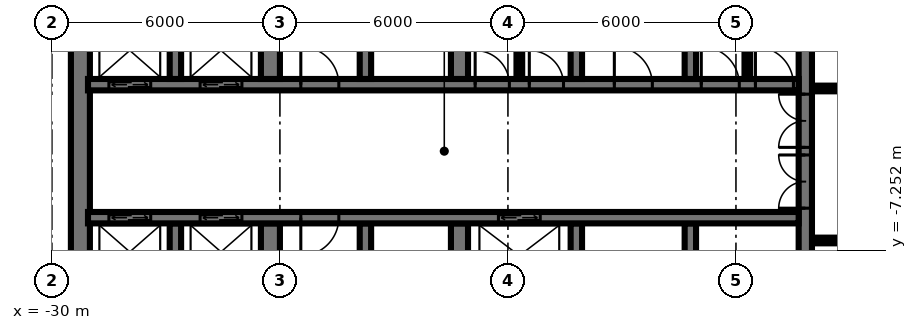
"""IFC4 building model, lengths in metres.
Left out: names, types, materials, properties, quantities, classifications, styles, units other than length and angle.
Written with IfcOpenShell. Run it as: python <this file> out.ifc"""

import sys

from ifc_helpers import new_model, si_unit, direction, frame, frame_2d, origin, place, context, subcontext, project, spatial, rectangle, extrude, element, fill, save


model = new_model("IFC4")
c1 = context("Model", 3, precision=1e-05, world=origin(), true_north=direction((0.0, 1.0)))
c2 = subcontext(c1, "Body", "Model", "MODEL_VIEW")
j1 = project(units=[si_unit("LENGTHUNIT", "METRE"), si_unit("PLANEANGLEUNIT", "RADIAN")], contexts=[c1])
p1 = place(None, origin())
s1 = spatial("IfcSite", under=j1, at=p1, CompositionType="ELEMENT")
p2 = place(p1, origin())
s2 = spatial("IfcBuilding", under=s1, at=p2, CompositionType="ELEMENT")
p3 = place(p2, frame((0.0, 0.0, 18.0)))
s3 = spatial("IfcBuildingStorey", under=s2, at=p3, CompositionType="ELEMENT", Elevation=18.0)
p4 = place(p3, frame((-10.175, -14.55, 0.0), z_axis=(0.0, 0.0, 1.0), x_axis=(0.0, 1.0, 0.0)))
e1 = element("IfcWall", 1, at=p4, inside=s3, PredefinedType="SHEAR", context=c2, shape_type="SweptSolid", body=[
    extrude(rectangle(XDim=14.1, YDim=0.35, at=frame_2d((7.05, 0.0))), origin(), (0.0, 0.0, 1.0), 6.0),
])
p5 = place(p4, frame((8.4, 0.0, 0.0)))
e2 = element("IfcOpeningElement", 2, at=p5, cuts=e1, PredefinedType="OPENING", context=c2, shape_type="SweptSolid", body=[
    extrude(rectangle(XDim=1.4, YDim=2.4, at=frame_2d((0.7, 1.2))), frame((0.0, 0.185, 0.0), z_axis=(0.0, -1.0, 0.0), x_axis=(1.0, 0.0, 0.0)), (0.0, 0.0, 1.0), 0.37),
])
p6 = place(p4, frame((10.0, 0.0, 0.0)))
e3 = element("IfcOpeningElement", 3, at=p6, cuts=e1, PredefinedType="OPENING", context=c2, shape_type="SweptSolid", body=[
    extrude(rectangle(XDim=1.4, YDim=2.4, at=frame_2d((0.7, 1.2))), frame((0.0, 0.185, 0.0), z_axis=(0.0, -1.0, 0.0), x_axis=(1.0, 0.0, 0.0)), (0.0, 0.0, 1.0), 0.37),
])
p7 = place(p4, frame((4.0, 0.0, 0.0)))
e4 = element("IfcOpeningElement", 4, at=p7, cuts=e1, PredefinedType="OPENING", context=c2, shape_type="SweptSolid", body=[
    extrude(rectangle(XDim=1.2, YDim=2.1, at=frame_2d((0.6, 1.05))), frame((0.0, 0.185, 0.0), z_axis=(0.0, -1.0, 0.0), x_axis=(1.0, 0.0, 0.0)), (0.0, 0.0, 1.0), 0.37),
])
p8 = place(p3, frame((-29.25, -14.55, 0.0), z_axis=(0.0, 0.0, 1.0), x_axis=(0.0, 1.0, 0.0)))
e5 = element("IfcWall", 5, at=p8, inside=s3, PredefinedType="SHEAR", context=c2, shape_type="SweptSolid", body=[
    extrude(rectangle(XDim=14.1, YDim=0.5, at=frame_2d((7.05, 0.0))), origin(), (0.0, 0.0, 1.0), 6.0),
])
p9 = place(p3, frame((-29.05, -2.9, 0.0), z_axis=(0.0, 0.0, 1.0), x_axis=(1.0, 0.0, 0.0)))
e6 = element("IfcWall", 6, at=p9, inside=s3, PredefinedType="SHEAR", context=c2, shape_type="SweptSolid", body=[
    extrude(rectangle(XDim=18.7, YDim=0.3, at=frame_2d((9.35, 0.0))), origin(), (0.0, 0.0, 1.0), 6.0),
])
p10 = place(p9, frame((2.95, 0.0, 0.0)))
e7 = element("IfcOpeningElement", 7, at=p10, cuts=e6, PredefinedType="OPENING", context=c2, shape_type="SweptSolid", body=[
    extrude(rectangle(XDim=1.1, YDim=2.1, at=frame_2d((0.55, 1.05))), frame((0.0, 0.16, 0.0), z_axis=(0.0, -1.0, 0.0), x_axis=(1.0, 0.0, 0.0)), (0.0, 0.0, 1.0), 0.32),
])
p11 = place(p9, frame((0.55, 0.0, 0.0)))
e8 = element("IfcOpeningElement", 8, at=p11, cuts=e6, PredefinedType="OPENING", context=c2, shape_type="SweptSolid", body=[
    extrude(rectangle(XDim=1.1, YDim=2.1, at=frame_2d((0.55, 1.05))), frame((0.0, 0.16, 0.0), z_axis=(0.0, -1.0, 0.0), x_axis=(1.0, 0.0, 0.0)), (0.0, 0.0, 1.0), 0.32),
])
p12 = place(p9, frame((11.613, 0.0, 0.0)))
e9 = element("IfcOpeningElement", 9, at=p12, cuts=e6, PredefinedType="OPENING", context=c2, shape_type="SweptSolid", body=[
    extrude(rectangle(XDim=0.9, YDim=2.1, at=frame_2d((0.45, 1.05))), frame((0.0, 0.16, 0.0), z_axis=(0.0, -1.0, 0.0), x_axis=(1.0, 0.0, 0.0)), (0.0, 0.0, 1.0), 0.32),
])
p13 = place(p9, frame((10.188, 0.0, 0.0)))
e10 = element("IfcOpeningElement", 10, at=p13, cuts=e6, PredefinedType="OPENING", context=c2, shape_type="SweptSolid", body=[
    extrude(rectangle(XDim=0.9, YDim=2.1, at=frame_2d((0.45, 1.05))), frame((0.0, 0.16, 0.0), z_axis=(0.0, -1.0, 0.0), x_axis=(1.0, 0.0, 0.0)), (0.0, 0.0, 1.0), 0.32),
])
p14 = place(p9, frame((17.562, 0.0, 0.0)))
e11 = element("IfcOpeningElement", 11, at=p14, cuts=e6, PredefinedType="OPENING", context=c2, shape_type="SweptSolid", body=[
    extrude(rectangle(XDim=1.0, YDim=2.1, at=frame_2d((0.5, 1.05))), frame((0.0, 0.16, 0.0), z_axis=(0.0, -1.0, 0.0), x_axis=(1.0, 0.0, 0.0)), (0.0, 0.0, 1.0), 0.32),
])
p15 = place(p9, frame((16.137, 0.0, 0.0)))
e12 = element("IfcOpeningElement", 12, at=p15, cuts=e6, PredefinedType="OPENING", context=c2, shape_type="SweptSolid", body=[
    extrude(rectangle(XDim=1.0, YDim=2.1, at=frame_2d((0.5, 1.05))), frame((0.0, 0.16, 0.0), z_axis=(0.0, -1.0, 0.0), x_axis=(1.0, 0.0, 0.0)), (0.0, 0.0, 1.0), 0.32),
])
p16 = place(p9, frame((13.85, 0.0, 0.0)))
e13 = element("IfcOpeningElement", 13, at=p16, cuts=e6, PredefinedType="OPENING", context=c2, shape_type="SweptSolid", body=[
    extrude(rectangle(XDim=1.0, YDim=2.1, at=frame_2d((0.5, 1.05))), frame((0.0, 0.16, 0.0), z_axis=(0.0, -1.0, 0.0), x_axis=(1.0, 0.0, 0.0)), (0.0, 0.0, 1.0), 0.32),
])
p17 = place(p9, frame((5.6, 0.0, 0.0)))
e14 = element("IfcOpeningElement", 14, at=p17, cuts=e6, PredefinedType="OPENING", context=c2, shape_type="SweptSolid", body=[
    extrude(rectangle(XDim=1.0, YDim=2.1, at=frame_2d((0.5, 1.05))), frame((0.0, 0.16, 0.0), z_axis=(0.0, -1.0, 0.0), x_axis=(1.0, 0.0, 0.0)), (0.0, 0.0, 1.0), 0.32),
])
p18 = place(p3, frame((-29.05, -6.4, 0.0), z_axis=(0.0, 0.0, 1.0), x_axis=(1.0, 0.0, 0.0)))
e15 = element("IfcWall", 15, at=p18, inside=s3, PredefinedType="SHEAR", context=c2, shape_type="SweptSolid", body=[
    extrude(rectangle(XDim=18.7, YDim=0.3, at=frame_2d((9.35, 0.0))), origin(), (0.0, 0.0, 1.0), 6.0),
])
p19 = place(p18, frame((2.95, 0.0, 0.0)))
e16 = element("IfcOpeningElement", 16, at=p19, cuts=e15, PredefinedType="OPENING", context=c2, shape_type="SweptSolid", body=[
    extrude(rectangle(XDim=1.1, YDim=2.1, at=frame_2d((0.55, 1.05))), frame((0.0, 0.16, 0.0), z_axis=(0.0, -1.0, 0.0), x_axis=(1.0, 0.0, 0.0)), (0.0, 0.0, 1.0), 0.32),
])
p20 = place(p18, frame((0.55, 0.0, 0.0)))
e17 = element("IfcOpeningElement", 17, at=p20, cuts=e15, PredefinedType="OPENING", context=c2, shape_type="SweptSolid", body=[
    extrude(rectangle(XDim=1.1, YDim=2.1, at=frame_2d((0.55, 1.05))), frame((0.0, 0.16, 0.0), z_axis=(0.0, -1.0, 0.0), x_axis=(1.0, 0.0, 0.0)), (0.0, 0.0, 1.0), 0.32),
])
p21 = place(p18, frame((10.8, 0.0, 0.0)))
e18 = element("IfcOpeningElement", 18, at=p21, cuts=e15, PredefinedType="OPENING", context=c2, shape_type="SweptSolid", body=[
    extrude(rectangle(XDim=1.1, YDim=2.1, at=frame_2d((0.55, 1.05))), frame((0.0, 0.16, 0.0), z_axis=(0.0, -1.0, 0.0), x_axis=(1.0, 0.0, 0.0)), (0.0, 0.0, 1.0), 0.32),
])
p22 = place(p18, frame((5.6, 0.0, 0.0)))
e19 = element("IfcOpeningElement", 19, at=p22, cuts=e15, PredefinedType="OPENING", context=c2, shape_type="SweptSolid", body=[
    extrude(rectangle(XDim=1.0, YDim=2.1, at=frame_2d((0.5, 1.05))), frame((0.0, 0.16, 0.0), z_axis=(0.0, -1.0, 0.0), x_axis=(1.0, 0.0, 0.0)), (0.0, 0.0, 1.0), 0.32),
])
for number, where, z_axis, x_axis in (
    (20, (-13.2, -2.75, 0.0), (0.0, 0.0, 1.0), (0.0, 1.0, 0.0)),
    (21, (-13.2, -8.85, 0.0), (0.0, 0.0, 1.0), (0.0, 1.0, 0.0)),
    (22, (-16.2, -2.75, 0.0), (0.0, 0.0, 1.0), (0.0, 1.0, 0.0)),
    (23, (-16.2, -8.85, 0.0), (0.0, 0.0, 1.0), (0.0, 1.0, 0.0)),
):
    element("IfcWall", number, at=place(p3, frame(where, z_axis=z_axis, x_axis=x_axis)), inside=s3, PredefinedType="SHEAR", context=c2, shape_type="SweptSolid", body=[
        extrude(rectangle(XDim=2.3, YDim=0.3, at=frame_2d((1.15, 0.0))), origin(), (0.0, 0.0, 1.0), 6.0),
    ])
for number, where, z_axis, x_axis in (
    (24, (-19.275, -2.75, 0.0), (0.0, 0.0, 1.0), (0.0, 1.0, 0.0)),
    (25, (-19.275, -8.85, 0.0), (0.0, 0.0, 1.0), (0.0, 1.0, 0.0)),
):
    element("IfcWall", number, at=place(p3, frame(where, z_axis=z_axis, x_axis=x_axis)), inside=s3, PredefinedType="SHEAR", context=c2, shape_type="SweptSolid", body=[
        extrude(rectangle(XDim=2.3, YDim=0.45, at=frame_2d((1.15, 0.0))), origin(), (0.0, 0.0, 1.0), 6.0),
    ])
for number, where, z_axis, x_axis in (
    (26, (-21.75, -2.75, 0.0), (0.0, 0.0, 1.0), (0.0, 1.0, 0.0)),
    (27, (-21.75, -8.85, 0.0), (0.0, 0.0, 1.0), (0.0, 1.0, 0.0)),
):
    element("IfcWall", number, at=place(p3, frame(where, z_axis=z_axis, x_axis=x_axis)), inside=s3, PredefinedType="SHEAR", context=c2, shape_type="SweptSolid", body=[
        extrude(rectangle(XDim=2.3, YDim=0.3, at=frame_2d((1.15, 0.0))), origin(), (0.0, 0.0, 1.0), 6.0),
    ])
for number, where, z_axis, x_axis in (
    (28, (-24.25, -2.75, 0.0), (0.0, 0.0, 1.0), (0.0, 1.0, 0.0)),
    (29, (-24.25, -8.85, 0.0), (0.0, 0.0, 1.0), (0.0, 1.0, 0.0)),
):
    element("IfcWall", number, at=place(p3, frame(where, z_axis=z_axis, x_axis=x_axis)), inside=s3, PredefinedType="SHEAR", context=c2, shape_type="SweptSolid", body=[
        extrude(rectangle(XDim=2.3, YDim=0.5, at=frame_2d((1.15, 0.0))), origin(), (0.0, 0.0, 1.0), 6.0),
    ])
for number, where, z_axis, x_axis in (
    (30, (-26.75, -2.75, 0.0), (0.0, 0.0, 1.0), (0.0, 1.0, 0.0)),
    (31, (-26.75, -8.85, 0.0), (0.0, 0.0, 1.0), (0.0, 1.0, 0.0)),
):
    element("IfcWall", number, at=place(p3, frame(where, z_axis=z_axis, x_axis=x_axis)), inside=s3, PredefinedType="SHEAR", context=c2, shape_type="SweptSolid", body=[
        extrude(rectangle(XDim=2.3, YDim=0.3, at=frame_2d((1.15, 0.0))), origin(), (0.0, 0.0, 1.0), 6.0),
    ])
for number, where, z_axis, x_axis in (
    (32, (-17.7, -2.75, 0.0), (0.0, 0.0, 1.0), (0.0, 1.0, 0.0)),
    (33, (-11.7, -2.75, 0.0), (0.0, 0.0, 1.0), (0.0, 1.0, 0.0)),
):
    element("IfcWall", number, at=place(p3, frame(where, z_axis=z_axis, x_axis=x_axis)), inside=s3, PredefinedType="PARTITIONING", context=c2, shape_type="SweptSolid", body=[
        extrude(rectangle(XDim=2.3, YDim=0.15, at=frame_2d((1.15, 0.0))), origin(), (0.0, 0.0, 1.0), 5.7),
    ])
p23 = place(p3, frame((-9.95, -7.0, 0.0), z_axis=(0.0, 0.0, 1.0), x_axis=(1.0, 0.0, 0.0)))
e34 = element("IfcWall", 34, at=p23, inside=s3, PredefinedType="PARTITIONING", context=c2, shape_type="SweptSolid", body=[
    extrude(rectangle(XDim=19.9, YDim=0.15, at=frame_2d((9.95, 0.0))), origin(), (0.0, 0.0, 1.0), 5.55),
])
p24 = place(p23, frame((9.45, 0.0, 0.0)))
e35 = element("IfcOpeningElement", 35, at=p24, cuts=e34, PredefinedType="OPENING", context=c2, shape_type="SweptSolid", body=[
    extrude(rectangle(XDim=1.0, YDim=2.1, at=frame_2d((0.5, 1.05))), frame((0.0, 0.085, 0.0), z_axis=(0.0, -1.0, 0.0), x_axis=(1.0, 0.0, 0.0)), (0.0, 0.0, 1.0), 0.17),
])
p25 = place(p23, frame((2.0, 0.0, 0.0)))
e36 = element("IfcOpeningElement", 36, at=p25, cuts=e34, PredefinedType="OPENING", context=c2, shape_type="SweptSolid", body=[
    extrude(rectangle(XDim=1.0, YDim=2.1, at=frame_2d((0.5, 1.05))), frame((0.0, 0.085, 0.0), z_axis=(0.0, -1.0, 0.0), x_axis=(1.0, 0.0, 0.0)), (0.0, 0.0, 1.0), 0.17),
])
p26 = place(p3, frame((-9.95, -3.0, 0.0), z_axis=(0.0, 0.0, 1.0), x_axis=(1.0, 0.0, 0.0)))
e37 = element("IfcWall", 37, at=p26, inside=s3, PredefinedType="PARTITIONING", context=c2, shape_type="SweptSolid", body=[
    extrude(rectangle(XDim=19.9, YDim=0.15, at=frame_2d((9.95, 0.0))), origin(), (0.0, 0.0, 1.0), 5.55),
])
p27 = place(p26, frame((2.0, 0.0, 0.0)))
e38 = element("IfcOpeningElement", 38, at=p27, cuts=e37, PredefinedType="OPENING", context=c2, shape_type="SweptSolid", body=[
    extrude(rectangle(XDim=1.0, YDim=2.1, at=frame_2d((0.5, 1.05))), frame((0.0, 0.085, 0.0), z_axis=(0.0, -1.0, 0.0), x_axis=(1.0, 0.0, 0.0)), (0.0, 0.0, 1.0), 0.17),
])
p28 = place(p26, frame((11.9, 0.0, 0.0)))
e39 = element("IfcOpeningElement", 39, at=p28, cuts=e37, PredefinedType="OPENING", context=c2, shape_type="SweptSolid", body=[
    extrude(rectangle(XDim=1.0, YDim=2.1, at=frame_2d((0.5, 1.05))), frame((0.0, 0.085, 0.0), z_axis=(0.0, -1.0, 0.0), x_axis=(1.0, 0.0, 0.0)), (0.0, 0.0, 1.0), 0.17),
])
p29 = place(p26, frame((16.9, 0.0, 0.0)))
e40 = element("IfcOpeningElement", 40, at=p29, cuts=e37, PredefinedType="OPENING", context=c2, shape_type="SweptSolid", body=[
    extrude(rectangle(XDim=1.0, YDim=2.1, at=frame_2d((0.5, 1.05))), frame((0.0, 0.085, 0.0), z_axis=(0.0, -1.0, 0.0), x_axis=(1.0, 0.0, 0.0)), (0.0, 0.0, 1.0), 0.17),
])
p30 = place(p10, origin())
e41 = element("IfcDoor", 41, at=p30, inside=s3, OperationType="DOUBLE_DOOR_SLIDING", PredefinedType="USERDEFINED", context=c2, shape_type="SweptSolid", body=[
    extrude(rectangle(XDim=1.1, YDim=2.1, at=frame_2d((0.55, 1.05))), frame((0.0, 0.025, 0.0), z_axis=(0.0, -1.0, 0.0), x_axis=(1.0, 0.0, 0.0)), (0.0, 0.0, 1.0), 0.05),
])
fill(e7, e41)
p31 = place(p11, origin())
e42 = element("IfcDoor", 42, at=p31, inside=s3, OperationType="DOUBLE_DOOR_SLIDING", PredefinedType="USERDEFINED", context=c2, shape_type="SweptSolid", body=[
    extrude(rectangle(XDim=1.1, YDim=2.1, at=frame_2d((0.55, 1.05))), frame((0.0, 0.025, 0.0), z_axis=(0.0, -1.0, 0.0), x_axis=(1.0, 0.0, 0.0)), (0.0, 0.0, 1.0), 0.05),
])
fill(e8, e42)
p32 = place(p19, origin())
e43 = element("IfcDoor", 43, at=p32, inside=s3, OperationType="DOUBLE_DOOR_SLIDING", PredefinedType="USERDEFINED", context=c2, shape_type="SweptSolid", body=[
    extrude(rectangle(XDim=1.1, YDim=2.1, at=frame_2d((0.55, 1.05))), frame((0.0, 0.025, 0.0), z_axis=(0.0, -1.0, 0.0), x_axis=(1.0, 0.0, 0.0)), (0.0, 0.0, 1.0), 0.05),
])
fill(e16, e43)
p33 = place(p20, origin())
e44 = element("IfcDoor", 44, at=p33, inside=s3, OperationType="DOUBLE_DOOR_SLIDING", PredefinedType="USERDEFINED", context=c2, shape_type="SweptSolid", body=[
    extrude(rectangle(XDim=1.1, YDim=2.1, at=frame_2d((0.55, 1.05))), frame((0.0, 0.025, 0.0), z_axis=(0.0, -1.0, 0.0), x_axis=(1.0, 0.0, 0.0)), (0.0, 0.0, 1.0), 0.05),
])
fill(e17, e44)
p34 = place(p21, origin())
e45 = element("IfcDoor", 45, at=p34, inside=s3, OperationType="DOUBLE_DOOR_SLIDING", PredefinedType="USERDEFINED", context=c2, shape_type="SweptSolid", body=[
    extrude(rectangle(XDim=1.1, YDim=2.1, at=frame_2d((0.55, 1.05))), frame((0.0, 0.025, 0.0), z_axis=(0.0, -1.0, 0.0), x_axis=(1.0, 0.0, 0.0)), (0.0, 0.0, 1.0), 0.05),
])
fill(e18, e45)
p35 = place(p5, origin())
e46 = element("IfcDoor", 46, at=p35, inside=s3, OperationType="DOUBLE_DOOR_SINGLE_SWING", PredefinedType="DOOR", context=c2, shape_type="SweptSolid", body=[
    extrude(rectangle(XDim=1.4, YDim=2.4, at=frame_2d((0.7, 1.2))), frame((0.0, 0.025, 0.0), z_axis=(0.0, -1.0, 0.0), x_axis=(1.0, 0.0, 0.0)), (0.0, 0.0, 1.0), 0.05),
])
fill(e2, e46)
p36 = place(p6, origin())
e47 = element("IfcDoor", 47, at=p36, inside=s3, OperationType="DOUBLE_DOOR_SINGLE_SWING", PredefinedType="DOOR", context=c2, shape_type="SweptSolid", body=[
    extrude(rectangle(XDim=1.4, YDim=2.4, at=frame_2d((0.7, 1.2))), frame((0.0, 0.025, 0.0), z_axis=(0.0, -1.0, 0.0), x_axis=(1.0, 0.0, 0.0)), (0.0, 0.0, 1.0), 0.05),
])
fill(e3, e47)
p37 = place(p12, origin())
e48 = element("IfcDoor", 48, at=p37, inside=s3, OperationType="SINGLE_SWING_RIGHT", PredefinedType="DOOR", context=c2, shape_type="SweptSolid", body=[
    extrude(rectangle(XDim=0.9, YDim=2.1, at=frame_2d((0.45, 1.05))), frame((0.0, 0.025, 0.0), z_axis=(0.0, -1.0, 0.0), x_axis=(1.0, 0.0, 0.0)), (0.0, 0.0, 1.0), 0.05),
])
fill(e9, e48)
p38 = place(p13, origin())
e49 = element("IfcDoor", 49, at=p38, inside=s3, OperationType="SINGLE_SWING_RIGHT", PredefinedType="DOOR", context=c2, shape_type="SweptSolid", body=[
    extrude(rectangle(XDim=0.9, YDim=2.1, at=frame_2d((0.45, 1.05))), frame((0.0, 0.025, 0.0), z_axis=(0.0, -1.0, 0.0), x_axis=(1.0, 0.0, 0.0)), (0.0, 0.0, 1.0), 0.05),
])
fill(e10, e49)
p39 = place(p14, origin())
e50 = element("IfcDoor", 50, at=p39, inside=s3, OperationType="SINGLE_SWING_RIGHT", PredefinedType="DOOR", context=c2, shape_type="SweptSolid", body=[
    extrude(rectangle(XDim=1.0, YDim=2.1, at=frame_2d((0.5, 1.05))), frame((0.0, 0.025, 0.0), z_axis=(0.0, -1.0, 0.0), x_axis=(1.0, 0.0, 0.0)), (0.0, 0.0, 1.0), 0.05),
])
fill(e11, e50)
p40 = place(p15, origin())
e51 = element("IfcDoor", 51, at=p40, inside=s3, OperationType="SINGLE_SWING_RIGHT", PredefinedType="DOOR", context=c2, shape_type="SweptSolid", body=[
    extrude(rectangle(XDim=1.0, YDim=2.1, at=frame_2d((0.5, 1.05))), frame((0.0, 0.025, 0.0), z_axis=(0.0, -1.0, 0.0), x_axis=(1.0, 0.0, 0.0)), (0.0, 0.0, 1.0), 0.05),
])
fill(e12, e51)
p41 = place(p16, origin())
e52 = element("IfcDoor", 52, at=p41, inside=s3, OperationType="SINGLE_SWING_RIGHT", PredefinedType="DOOR", context=c2, shape_type="SweptSolid", body=[
    extrude(rectangle(XDim=1.0, YDim=2.1, at=frame_2d((0.5, 1.05))), frame((0.0, 0.025, 0.0), z_axis=(0.0, -1.0, 0.0), x_axis=(1.0, 0.0, 0.0)), (0.0, 0.0, 1.0), 0.05),
])
fill(e13, e52)
p42 = place(p17, origin())
e53 = element("IfcDoor", 53, at=p42, inside=s3, OperationType="SINGLE_SWING_RIGHT", PredefinedType="DOOR", context=c2, shape_type="SweptSolid", body=[
    extrude(rectangle(XDim=1.0, YDim=2.1, at=frame_2d((0.5, 1.05))), frame((0.0, 0.025, 0.0), z_axis=(0.0, -1.0, 0.0), x_axis=(1.0, 0.0, 0.0)), (0.0, 0.0, 1.0), 0.05),
])
fill(e14, e53)
p43 = place(p22, frame((0.5, 0.0, 0.0), z_axis=(0.0, 0.0, 1.0), x_axis=(-1.0, 0.0, 0.0)))
e54 = element("IfcDoor", 54, at=p43, inside=s3, OperationType="SINGLE_SWING_LEFT", PredefinedType="DOOR", context=c2, shape_type="SweptSolid", body=[
    extrude(rectangle(XDim=1.0, YDim=2.1, at=frame_2d((0.0, 1.05))), frame((0.0, -0.025, 0.0), z_axis=(0.0, 1.0, 0.0), x_axis=(-1.0, 0.0, 0.0)), (0.0, 0.0, 1.0), 0.05),
])
fill(e19, e54)
save(model, sys.argv[1])
